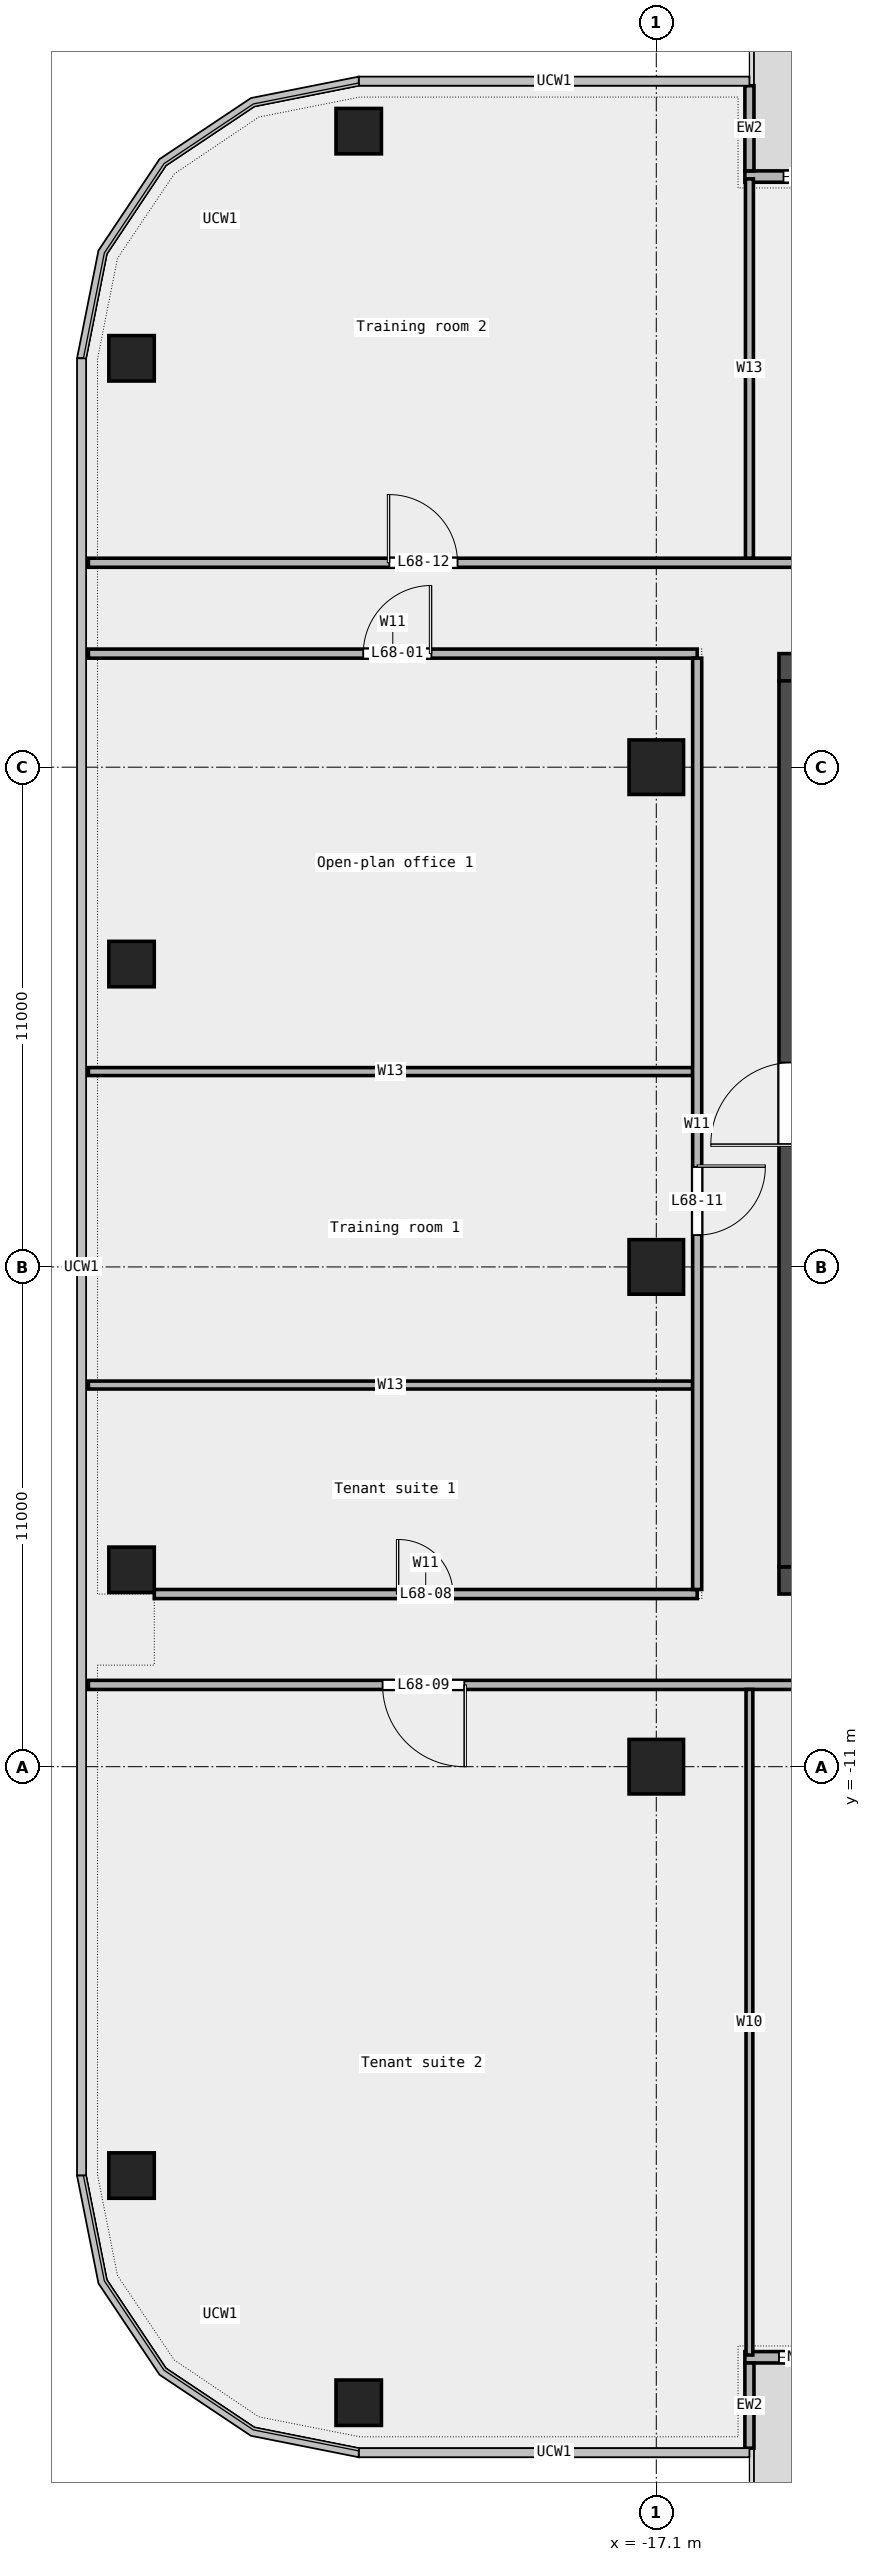
"""IFC4 building model, lengths in metres.
Left out: names, types, materials, properties, quantities, classifications, styles, units other than length and angle.
Written with IfcOpenShell. Run it as: python <this file> out.ifc"""

import sys

from ifc_helpers import new_model, si_unit, direction, frame, frame_2d, origin, origin_2d, place, context, subcontext, project, spatial, rectangle, extrude, element, fill, save


model = new_model("IFC4")
c1 = context("Model", 3, precision=1e-05, world=origin(), true_north=direction((0.0, 1.0)))
c2 = subcontext(c1, "Body", "Model", "MODEL_VIEW")
j1 = project(units=[si_unit("LENGTHUNIT", "METRE"), si_unit("PLANEANGLEUNIT", "RADIAN")], contexts=[c1])
p1 = place(None, origin())
s1 = spatial("IfcSite", under=j1, at=p1, CompositionType="ELEMENT")
p2 = place(p1, origin())
s2 = spatial("IfcBuilding", under=s1, at=p2, CompositionType="ELEMENT")
p3 = place(p2, frame((0.0, 0.0, 311.4)))
s3 = spatial("IfcBuildingStorey", under=s2, at=p3, CompositionType="ELEMENT", Elevation=311.4)
for number, where, z_axis, x_axis in (
    (1, (-23.65, -25.0, 0.0), (0.0, 0.0, 1.0), (1.0, 0.0, 0.0)),
    (2, (-23.65, 25.0, 0.0), (0.0, 0.0, 1.0), (1.0, 0.0, 0.0)),
    (3, (-28.65, 20.0, 0.0), (0.0, 0.0, 1.0), (1.0, 0.0, 0.0)),
    (4, (-28.65, 6.667, 0.0), (0.0, 0.0, 1.0), (1.0, 0.0, 0.0)),
    (5, (-28.65, -6.667, 0.0), (0.0, 0.0, 1.0), (1.0, 0.0, 0.0)),
    (6, (-28.65, -20.0, 0.0), (0.0, 0.0, 1.0), (1.0, 0.0, 0.0)),
):
    element("IfcColumn", number, at=place(p3, frame(where, z_axis=z_axis, x_axis=x_axis)), inside=s3, PredefinedType="COLUMN", context=c2, shape_type="SweptSolid", body=[
        extrude(rectangle(XDim=1.0, YDim=1.0, at=origin_2d()), origin(), (0.0, 0.0, 1.0), 3.4),
    ])
for number, where, z_axis, x_axis in (
    (7, (-17.1, -11.0, 0.0), (0.0, 0.0, 1.0), (1.0, 0.0, 0.0)),
    (8, (-17.1, 0.0, 0.0), (0.0, 0.0, 1.0), (1.0, 0.0, 0.0)),
    (9, (-17.1, 11.0, 0.0), (0.0, 0.0, 1.0), (1.0, 0.0, 0.0)),
):
    element("IfcColumn", number, at=place(p3, frame(where, z_axis=z_axis, x_axis=x_axis)), inside=s3, PredefinedType="COLUMN", context=c2, shape_type="SweptSolid", body=[
        extrude(rectangle(XDim=1.2, YDim=1.2, at=origin_2d()), origin(), (0.0, 0.0, 1.0), 3.4),
    ])
p4 = place(p3, frame((-2.05, 24.0, 0.0), z_axis=(0.0, 0.0, 1.0), x_axis=(-1.0, 0.0, 0.0)))
e10 = element("IfcWall", 10, at=p4, inside=s3, PredefinedType="STANDARD", context=c2, shape_type="SweptSolid", body=[
    extrude(rectangle(XDim=13.1, YDim=0.25, at=frame_2d((6.55, 0.0))), origin(), (0.0, 0.0, 1.0), 3.4),
])
p5 = place(p4, frame((1.5, 0.0, 0.45)))
e11 = element("IfcOpeningElement", 11, at=p5, cuts=e10, PredefinedType="OPENING", context=c2, shape_type="SweptSolid", body=[
    extrude(rectangle(XDim=1.5, YDim=2.4, at=frame_2d((0.75, 1.2))), frame((0.0, 0.137, 0.0), z_axis=(0.0, -1.0, 0.0), x_axis=(1.0, 0.0, 0.0)), (0.0, 0.0, 1.0), 0.274),
])
p6 = place(p4, frame((5.75, 0.0, 0.0)))
e12 = element("IfcOpeningElement", 12, at=p6, cuts=e10, PredefinedType="OPENING", context=c2, shape_type="SweptSolid", body=[
    extrude(rectangle(XDim=1.8, YDim=2.4, at=frame_2d((0.9, 1.2))), frame((0.0, 0.137, 0.0), z_axis=(0.0, -1.0, 0.0), x_axis=(1.0, 0.0, 0.0)), (0.0, 0.0, 1.0), 0.274),
])
p7 = place(p4, frame((10.75, 0.0, 0.45)))
e13 = element("IfcOpeningElement", 13, at=p7, cuts=e10, PredefinedType="OPENING", context=c2, shape_type="SweptSolid", body=[
    extrude(rectangle(XDim=1.5, YDim=2.4, at=frame_2d((0.75, 1.2))), frame((0.0, 0.137, 0.0), z_axis=(0.0, -1.0, 0.0), x_axis=(1.0, 0.0, 0.0)), (0.0, 0.0, 1.0), 0.274),
])
p8 = place(p3, frame((-15.05, 26.0, 0.0), z_axis=(0.0, 0.0, 1.0), x_axis=(0.0, -1.0, 0.0)))
e14 = element("IfcWall", 14, at=p8, inside=s3, PredefinedType="STANDARD", context=c2, shape_type="SweptSolid", body=[
    extrude(rectangle(XDim=1.875, YDim=0.2, at=frame_2d((0.938, 0.0))), origin(), (0.0, 0.0, 1.0), 3.4),
])
p9 = place(p3, frame((-15.15, -24.0, 0.0), z_axis=(0.0, 0.0, 1.0), x_axis=(1.0, 0.0, 0.0)))
e15 = element("IfcWall", 15, at=p9, inside=s3, PredefinedType="STANDARD", context=c2, shape_type="SweptSolid", body=[
    extrude(rectangle(XDim=13.1, YDim=0.25, at=frame_2d((6.55, 0.0))), origin(), (0.0, 0.0, 1.0), 3.4),
])
p10 = place(p9, frame((0.75, 0.0, 0.45)))
e16 = element("IfcOpeningElement", 16, at=p10, cuts=e15, PredefinedType="OPENING", context=c2, shape_type="SweptSolid", body=[
    extrude(rectangle(XDim=1.5, YDim=2.4, at=frame_2d((0.75, 1.2))), frame((0.0, 0.137, 0.0), z_axis=(0.0, -1.0, 0.0), x_axis=(1.0, 0.0, 0.0)), (0.0, 0.0, 1.0), 0.274),
])
p11 = place(p9, frame((5.75, 0.0, 0.0)))
e17 = element("IfcOpeningElement", 17, at=p11, cuts=e15, PredefinedType="OPENING", context=c2, shape_type="SweptSolid", body=[
    extrude(rectangle(XDim=1.8, YDim=2.4, at=frame_2d((0.9, 1.2))), frame((0.0, 0.137, 0.0), z_axis=(0.0, -1.0, 0.0), x_axis=(1.0, 0.0, 0.0)), (0.0, 0.0, 1.0), 0.274),
])
p12 = place(p9, frame((10.0, 0.0, 0.45)))
e18 = element("IfcOpeningElement", 18, at=p12, cuts=e15, PredefinedType="OPENING", context=c2, shape_type="SweptSolid", body=[
    extrude(rectangle(XDim=1.5, YDim=2.4, at=frame_2d((0.75, 1.2))), frame((0.0, 0.137, 0.0), z_axis=(0.0, -1.0, 0.0), x_axis=(1.0, 0.0, 0.0)), (0.0, 0.0, 1.0), 0.274),
])
p13 = place(p3, frame((-15.05, -26.0, 0.0), z_axis=(0.0, 0.0, 1.0), x_axis=(0.0, 1.0, 0.0)))
e19 = element("IfcWall", 19, at=p13, inside=s3, PredefinedType="STANDARD", context=c2, shape_type="SweptSolid", body=[
    extrude(rectangle(XDim=1.875, YDim=0.2, at=frame_2d((0.938, 0.0))), origin(), (0.0, 0.0, 1.0), 3.4),
])
p14 = place(p3, frame((-29.6, -9.2, 0.0), z_axis=(0.0, 0.0, 1.0), x_axis=(1.0, 0.0, 0.0)))
e20 = element("IfcWall", 20, at=p14, inside=s3, PredefinedType="PARTITIONING", context=c2, shape_type="SweptSolid", body=[
    extrude(rectangle(XDim=59.2, YDim=0.2, at=frame_2d((29.6, 0.0))), origin(), (0.0, 0.0, 1.0), 3.4),
])
p15 = place(p14, frame((47.615, 0.0, 0.0)))
e21 = element("IfcOpeningElement", 21, at=p15, cuts=e20, PredefinedType="OPENING", context=c2, shape_type="SweptSolid", body=[
    extrude(rectangle(XDim=1.8, YDim=2.1, at=frame_2d((0.9, 1.05))), frame((0.0, 0.112, 0.0), z_axis=(0.0, -1.0, 0.0), x_axis=(1.0, 0.0, 0.0)), (0.0, 0.0, 1.0), 0.224),
])
p16 = place(p14, frame((20.1, 0.0, 0.0)))
e22 = element("IfcOpeningElement", 22, at=p16, cuts=e20, PredefinedType="OPENING", context=c2, shape_type="SweptSolid", body=[
    extrude(rectangle(XDim=1.8, YDim=2.1, at=frame_2d((0.9, 1.05))), frame((0.0, 0.112, 0.0), z_axis=(0.0, -1.0, 0.0), x_axis=(1.0, 0.0, 0.0)), (0.0, 0.0, 1.0), 0.224),
])
p17 = place(p14, frame((6.475, 0.0, 0.0)))
e23 = element("IfcOpeningElement", 23, at=p17, cuts=e20, PredefinedType="OPENING", context=c2, shape_type="SweptSolid", body=[
    extrude(rectangle(XDim=1.8, YDim=2.1, at=frame_2d((0.9, 1.05))), frame((0.0, 0.112, 0.0), z_axis=(0.0, -1.0, 0.0), x_axis=(1.0, 0.0, 0.0)), (0.0, 0.0, 1.0), 0.224),
])
p18 = place(p14, frame((31.09, 0.0, 0.0)))
e24 = element("IfcOpeningElement", 24, at=p18, cuts=e20, PredefinedType="OPENING", context=c2, shape_type="SweptSolid", body=[
    extrude(rectangle(XDim=1.5, YDim=2.1, at=frame_2d((0.75, 1.05))), frame((0.0, 0.112, 0.0), z_axis=(0.0, -1.0, 0.0), x_axis=(1.0, 0.0, 0.0)), (0.0, 0.0, 1.0), 0.224),
])
p19 = place(p3, frame((-28.15, -7.2, 0.0), z_axis=(0.0, 0.0, 1.0), x_axis=(1.0, 0.0, 0.0)))
e25 = element("IfcWall", 25, at=p19, inside=s3, PredefinedType="PARTITIONING", context=c2, shape_type="SweptSolid", body=[
    extrude(rectangle(XDim=11.95, YDim=0.2, at=frame_2d((5.975, 0.0))), origin(), (0.0, 0.0, 1.0), 3.4),
])
p20 = place(p19, frame((5.375, 0.0, 0.0)))
e26 = element("IfcOpeningElement", 26, at=p20, cuts=e25, PredefinedType="OPENING", context=c2, shape_type="SweptSolid", body=[
    extrude(rectangle(XDim=1.2, YDim=2.1, at=frame_2d((0.6, 1.05))), frame((0.0, 0.112, 0.0), z_axis=(0.0, -1.0, 0.0), x_axis=(1.0, 0.0, 0.0)), (0.0, 0.0, 1.0), 0.224),
])
for number, where, z_axis, x_axis in (
    (27, (-29.6, -2.6, 0.0), (0.0, 0.0, 1.0), (1.0, 0.0, 0.0)),
    (28, (-29.6, 4.3, 0.0), (0.0, 0.0, 1.0), (1.0, 0.0, 0.0)),
):
    element("IfcWall", number, at=place(p3, frame(where, z_axis=z_axis, x_axis=x_axis)), inside=s3, PredefinedType="PARTITIONING", context=c2, shape_type="SweptSolid", body=[
        extrude(rectangle(XDim=13.3, YDim=0.175, at=frame_2d((6.65, 0.0))), origin(), (0.0, 0.0, 1.0), 3.4),
    ])
p21 = place(p3, frame((-29.6, 13.5, 0.0), z_axis=(0.0, 0.0, 1.0), x_axis=(1.0, 0.0, 0.0)))
e29 = element("IfcWall", 29, at=p21, inside=s3, PredefinedType="PARTITIONING", context=c2, shape_type="SweptSolid", body=[
    extrude(rectangle(XDim=13.4, YDim=0.2, at=frame_2d((6.7, 0.0))), origin(), (0.0, 0.0, 1.0), 3.4),
])
p22 = place(p21, frame((6.05, 0.0, 0.0)))
e30 = element("IfcOpeningElement", 30, at=p22, cuts=e29, PredefinedType="OPENING", context=c2, shape_type="SweptSolid", body=[
    extrude(rectangle(XDim=1.5, YDim=2.1, at=frame_2d((0.75, 1.05))), frame((0.0, 0.112, 0.0), z_axis=(0.0, -1.0, 0.0), x_axis=(1.0, 0.0, 0.0)), (0.0, 0.0, 1.0), 0.224),
])
p23 = place(p3, frame((-29.6, 15.5, 0.0), z_axis=(0.0, 0.0, 1.0), x_axis=(1.0, 0.0, 0.0)))
e31 = element("IfcWall", 31, at=p23, inside=s3, PredefinedType="PARTITIONING", context=c2, shape_type="SweptSolid", body=[
    extrude(rectangle(XDim=59.2, YDim=0.2, at=frame_2d((29.6, 0.0))), origin(), (0.0, 0.0, 1.0), 3.4),
])
p24 = place(p23, frame((20.25, 0.0, 0.0)))
e32 = element("IfcOpeningElement", 32, at=p24, cuts=e31, PredefinedType="OPENING", context=c2, shape_type="SweptSolid", body=[
    extrude(rectangle(XDim=1.5, YDim=2.1, at=frame_2d((0.75, 1.05))), frame((0.0, 0.112, 0.0), z_axis=(0.0, -1.0, 0.0), x_axis=(1.0, 0.0, 0.0)), (0.0, 0.0, 1.0), 0.224),
])
p25 = place(p23, frame((49.825, 0.0, 0.0)))
e33 = element("IfcOpeningElement", 33, at=p25, cuts=e31, PredefinedType="OPENING", context=c2, shape_type="SweptSolid", body=[
    extrude(rectangle(XDim=1.8, YDim=2.1, at=frame_2d((0.9, 1.05))), frame((0.0, 0.112, 0.0), z_axis=(0.0, -1.0, 0.0), x_axis=(1.0, 0.0, 0.0)), (0.0, 0.0, 1.0), 0.224),
])
p26 = place(p23, frame((34.05, 0.0, 0.0)))
e34 = element("IfcOpeningElement", 34, at=p26, cuts=e31, PredefinedType="OPENING", context=c2, shape_type="SweptSolid", body=[
    extrude(rectangle(XDim=1.8, YDim=2.1, at=frame_2d((0.9, 1.05))), frame((0.0, 0.112, 0.0), z_axis=(0.0, -1.0, 0.0), x_axis=(1.0, 0.0, 0.0)), (0.0, 0.0, 1.0), 0.224),
])
p27 = place(p23, frame((6.625, 0.0, 0.0)))
e35 = element("IfcOpeningElement", 35, at=p27, cuts=e31, PredefinedType="OPENING", context=c2, shape_type="SweptSolid", body=[
    extrude(rectangle(XDim=1.5, YDim=2.1, at=frame_2d((0.75, 1.05))), frame((0.0, 0.112, 0.0), z_axis=(0.0, -1.0, 0.0), x_axis=(1.0, 0.0, 0.0)), (0.0, 0.0, 1.0), 0.224),
])
p28 = place(p3, frame((-16.2, -7.1, 0.0), z_axis=(0.0, 0.0, 1.0), x_axis=(0.0, 1.0, 0.0)))
e36 = element("IfcWall", 36, at=p28, inside=s3, PredefinedType="PARTITIONING", context=c2, shape_type="SweptSolid", body=[
    extrude(rectangle(XDim=20.5, YDim=0.2, at=frame_2d((10.25, 0.0))), origin(), (0.0, 0.0, 1.0), 3.4),
])
p29 = place(p28, frame((7.8, 0.0, 0.0)))
e37 = element("IfcOpeningElement", 37, at=p29, cuts=e36, PredefinedType="OPENING", context=c2, shape_type="SweptSolid", body=[
    extrude(rectangle(XDim=1.5, YDim=2.1, at=frame_2d((0.75, 1.05))), frame((0.0, 0.112, 0.0), z_axis=(0.0, -1.0, 0.0), x_axis=(1.0, 0.0, 0.0)), (0.0, 0.0, 1.0), 0.224),
])
p30 = place(p3, frame((-15.05, -23.95, 0.0), z_axis=(0.0, 0.0, 1.0), x_axis=(0.0, 1.0, 0.0)))
e38 = element("IfcWall", 38, at=p30, inside=s3, PredefinedType="PARTITIONING", context=c2, shape_type="SweptSolid", body=[
    extrude(rectangle(XDim=14.65, YDim=0.15, at=frame_2d((7.325, 0.0))), origin(), (0.0, 0.0, 1.0), 3.4),
])
p31 = place(p3, frame((-15.05, 15.6, 0.0), z_axis=(0.0, 0.0, 1.0), x_axis=(0.0, 1.0, 0.0)))
e39 = element("IfcWall", 39, at=p31, inside=s3, PredefinedType="PARTITIONING", context=c2, shape_type="SweptSolid", body=[
    extrude(rectangle(XDim=8.35, YDim=0.175, at=frame_2d((4.175, 0.0))), origin(), (0.0, 0.0, 1.0), 3.4),
])
p32 = place(p3, frame((-14.4, -6.9, 0.0), z_axis=(0.0, 0.0, 1.0), x_axis=(1.0, 0.0, 0.0)))
e40 = element("IfcWall", 40, at=p32, inside=s3, PredefinedType="SHEAR", context=c2, shape_type="SweptSolid", body=[
    extrude(rectangle(XDim=28.8, YDim=0.6, at=frame_2d((14.4, 0.0))), origin(), (0.0, 0.0, 1.0), 3.7),
])
p33 = place(p32, frame((4.337, 0.0, 0.0)))
e41 = element("IfcOpeningElement", 41, at=p33, cuts=e40, PredefinedType="OPENING", context=c2, shape_type="SweptSolid", body=[
    extrude(rectangle(XDim=1.0, YDim=2.1, at=frame_2d((0.5, 1.05))), frame((0.0, 0.312, 0.0), z_axis=(0.0, -1.0, 0.0), x_axis=(1.0, 0.0, 0.0)), (0.0, 0.0, 1.0), 0.624),
])
p34 = place(p32, frame((6.212, 0.0, 0.0)))
e42 = element("IfcOpeningElement", 42, at=p34, cuts=e40, PredefinedType="OPENING", context=c2, shape_type="SweptSolid", body=[
    extrude(rectangle(XDim=1.0, YDim=2.1, at=frame_2d((0.5, 1.05))), frame((0.0, 0.312, 0.0), z_axis=(0.0, -1.0, 0.0), x_axis=(1.0, 0.0, 0.0)), (0.0, 0.0, 1.0), 0.624),
])
p35 = place(p32, frame((10.8, 0.0, 0.0)))
e43 = element("IfcOpeningElement", 43, at=p35, cuts=e40, PredefinedType="OPENING", context=c2, shape_type="SweptSolid", body=[
    extrude(rectangle(XDim=1.2, YDim=2.1, at=frame_2d((0.6, 1.05))), frame((0.0, 0.312, 0.0), z_axis=(0.0, -1.0, 0.0), x_axis=(1.0, 0.0, 0.0)), (0.0, 0.0, 1.0), 0.624),
])
p36 = place(p32, frame((15.587, 0.0, 0.0)))
e44 = element("IfcOpeningElement", 44, at=p36, cuts=e40, PredefinedType="OPENING", context=c2, shape_type="SweptSolid", body=[
    extrude(rectangle(XDim=1.0, YDim=2.1, at=frame_2d((0.5, 1.05))), frame((0.0, 0.312, 0.0), z_axis=(0.0, -1.0, 0.0), x_axis=(1.0, 0.0, 0.0)), (0.0, 0.0, 1.0), 0.624),
])
p37 = place(p32, frame((18.75, 0.0, 0.0)))
e45 = element("IfcOpeningElement", 45, at=p37, cuts=e40, PredefinedType="OPENING", context=c2, shape_type="SweptSolid", body=[
    extrude(rectangle(XDim=1.8, YDim=2.1, at=frame_2d((0.9, 1.05))), frame((0.0, 0.312, 0.0), z_axis=(0.0, -1.0, 0.0), x_axis=(1.0, 0.0, 0.0)), (0.0, 0.0, 1.0), 0.624),
])
p38 = place(p32, frame((23.087, 0.0, 0.0)))
e46 = element("IfcOpeningElement", 46, at=p38, cuts=e40, PredefinedType="OPENING", context=c2, shape_type="SweptSolid", body=[
    extrude(rectangle(XDim=1.0, YDim=2.1, at=frame_2d((0.5, 1.05))), frame((0.0, 0.312, 0.0), z_axis=(0.0, -1.0, 0.0), x_axis=(1.0, 0.0, 0.0)), (0.0, 0.0, 1.0), 0.624),
])
p39 = place(p3, frame((-14.4, 13.2, 0.0), z_axis=(0.0, 0.0, 1.0), x_axis=(1.0, 0.0, 0.0)))
e47 = element("IfcWall", 47, at=p39, inside=s3, PredefinedType="SHEAR", context=c2, shape_type="SweptSolid", body=[
    extrude(rectangle(XDim=28.8, YDim=0.6, at=frame_2d((14.4, 0.0))), origin(), (0.0, 0.0, 1.0), 3.7),
])
p40 = place(p39, frame((6.3, 0.0, 0.0)))
e48 = element("IfcOpeningElement", 48, at=p40, cuts=e47, PredefinedType="OPENING", context=c2, shape_type="SweptSolid", body=[
    extrude(rectangle(XDim=1.2, YDim=2.1, at=frame_2d((0.6, 1.05))), frame((0.0, 0.312, 0.0), z_axis=(0.0, -1.0, 0.0), x_axis=(1.0, 0.0, 0.0)), (0.0, 0.0, 1.0), 0.624),
])
p41 = place(p39, frame((21.3, 0.0, 0.0)))
e49 = element("IfcOpeningElement", 49, at=p41, cuts=e47, PredefinedType="OPENING", context=c2, shape_type="SweptSolid", body=[
    extrude(rectangle(XDim=1.2, YDim=2.1, at=frame_2d((0.6, 1.05))), frame((0.0, 0.312, 0.0), z_axis=(0.0, -1.0, 0.0), x_axis=(1.0, 0.0, 0.0)), (0.0, 0.0, 1.0), 0.624),
])
p42 = place(p3, frame((-14.1, -6.6, 0.0), z_axis=(0.0, 0.0, 1.0), x_axis=(0.0, 1.0, 0.0)))
e50 = element("IfcWall", 50, at=p42, inside=s3, PredefinedType="SHEAR", context=c2, shape_type="SweptSolid", body=[
    extrude(rectangle(XDim=19.5, YDim=0.6, at=frame_2d((9.75, 0.0))), origin(), (0.0, 0.0, 1.0), 3.7),
])
p43 = place(p42, frame((9.3, 0.0, 0.0)))
e51 = element("IfcOpeningElement", 51, at=p43, cuts=e50, PredefinedType="OPENING", context=c2, shape_type="SweptSolid", body=[
    extrude(rectangle(XDim=1.8, YDim=2.1, at=frame_2d((0.9, 1.05))), frame((0.0, 0.312, 0.0), z_axis=(0.0, -1.0, 0.0), x_axis=(1.0, 0.0, 0.0)), (0.0, 0.0, 1.0), 0.624),
])
p44 = place(p7, origin())
e52 = element("IfcWindow", 52, at=p44, inside=s3, PartitioningType="SINGLE_PANEL", PredefinedType="WINDOW", context=c2, shape_type="SweptSolid", body=[
    extrude(rectangle(XDim=1.5, YDim=2.4, at=frame_2d((0.75, 1.2))), frame((0.0, 0.03, 0.0), z_axis=(0.0, -1.0, 0.0), x_axis=(1.0, 0.0, 0.0)), (0.0, 0.0, 1.0), 0.06),
])
fill(e13, e52)
p45 = place(p10, origin())
e53 = element("IfcWindow", 53, at=p45, inside=s3, PartitioningType="SINGLE_PANEL", PredefinedType="WINDOW", context=c2, shape_type="SweptSolid", body=[
    extrude(rectangle(XDim=1.5, YDim=2.4, at=frame_2d((0.75, 1.2))), frame((0.0, 0.03, 0.0), z_axis=(0.0, -1.0, 0.0), x_axis=(1.0, 0.0, 0.0)), (0.0, 0.0, 1.0), 0.06),
])
fill(e16, e53)
p46 = place(p22, origin())
e54 = element("IfcDoor", 54, at=p46, inside=s3, OperationType="DOUBLE_DOOR_SINGLE_SWING", PredefinedType="DOOR", context=c2, shape_type="SweptSolid", body=[
    extrude(rectangle(XDim=1.5, YDim=2.1, at=frame_2d((0.75, 1.05))), frame((0.0, 0.025, 0.0), z_axis=(0.0, -1.0, 0.0), x_axis=(1.0, 0.0, 0.0)), (0.0, 0.0, 1.0), 0.05),
])
fill(e30, e54)
p47 = place(p20, origin())
e55 = element("IfcDoor", 55, at=p47, inside=s3, OperationType="SINGLE_SWING_LEFT", PredefinedType="DOOR", context=c2, shape_type="SweptSolid", body=[
    extrude(rectangle(XDim=1.2, YDim=2.1, at=frame_2d((0.6, 1.05))), frame((0.0, 0.025, 0.0), z_axis=(0.0, -1.0, 0.0), x_axis=(1.0, 0.0, 0.0)), (0.0, 0.0, 1.0), 0.05),
])
fill(e26, e55)
p48 = place(p17, origin())
e56 = element("IfcDoor", 56, at=p48, inside=s3, OperationType="DOUBLE_DOOR_SINGLE_SWING", PredefinedType="DOOR", context=c2, shape_type="SweptSolid", body=[
    extrude(rectangle(XDim=1.8, YDim=2.1, at=frame_2d((0.9, 1.05))), frame((0.0, 0.025, 0.0), z_axis=(0.0, -1.0, 0.0), x_axis=(1.0, 0.0, 0.0)), (0.0, 0.0, 1.0), 0.05),
])
fill(e23, e56)
p49 = place(p29, origin())
e57 = element("IfcDoor", 57, at=p49, inside=s3, OperationType="DOUBLE_DOOR_SINGLE_SWING", PredefinedType="DOOR", context=c2, shape_type="SweptSolid", body=[
    extrude(rectangle(XDim=1.5, YDim=2.1, at=frame_2d((0.75, 1.05))), frame((0.0, 0.025, 0.0), z_axis=(0.0, -1.0, 0.0), x_axis=(1.0, 0.0, 0.0)), (0.0, 0.0, 1.0), 0.05),
])
fill(e37, e57)
p50 = place(p27, origin())
e58 = element("IfcDoor", 58, at=p50, inside=s3, OperationType="DOUBLE_DOOR_SINGLE_SWING", PredefinedType="DOOR", context=c2, shape_type="SweptSolid", body=[
    extrude(rectangle(XDim=1.5, YDim=2.1, at=frame_2d((0.75, 1.05))), frame((0.0, 0.025, 0.0), z_axis=(0.0, -1.0, 0.0), x_axis=(1.0, 0.0, 0.0)), (0.0, 0.0, 1.0), 0.05),
])
fill(e35, e58)
save(model, sys.argv[1])
